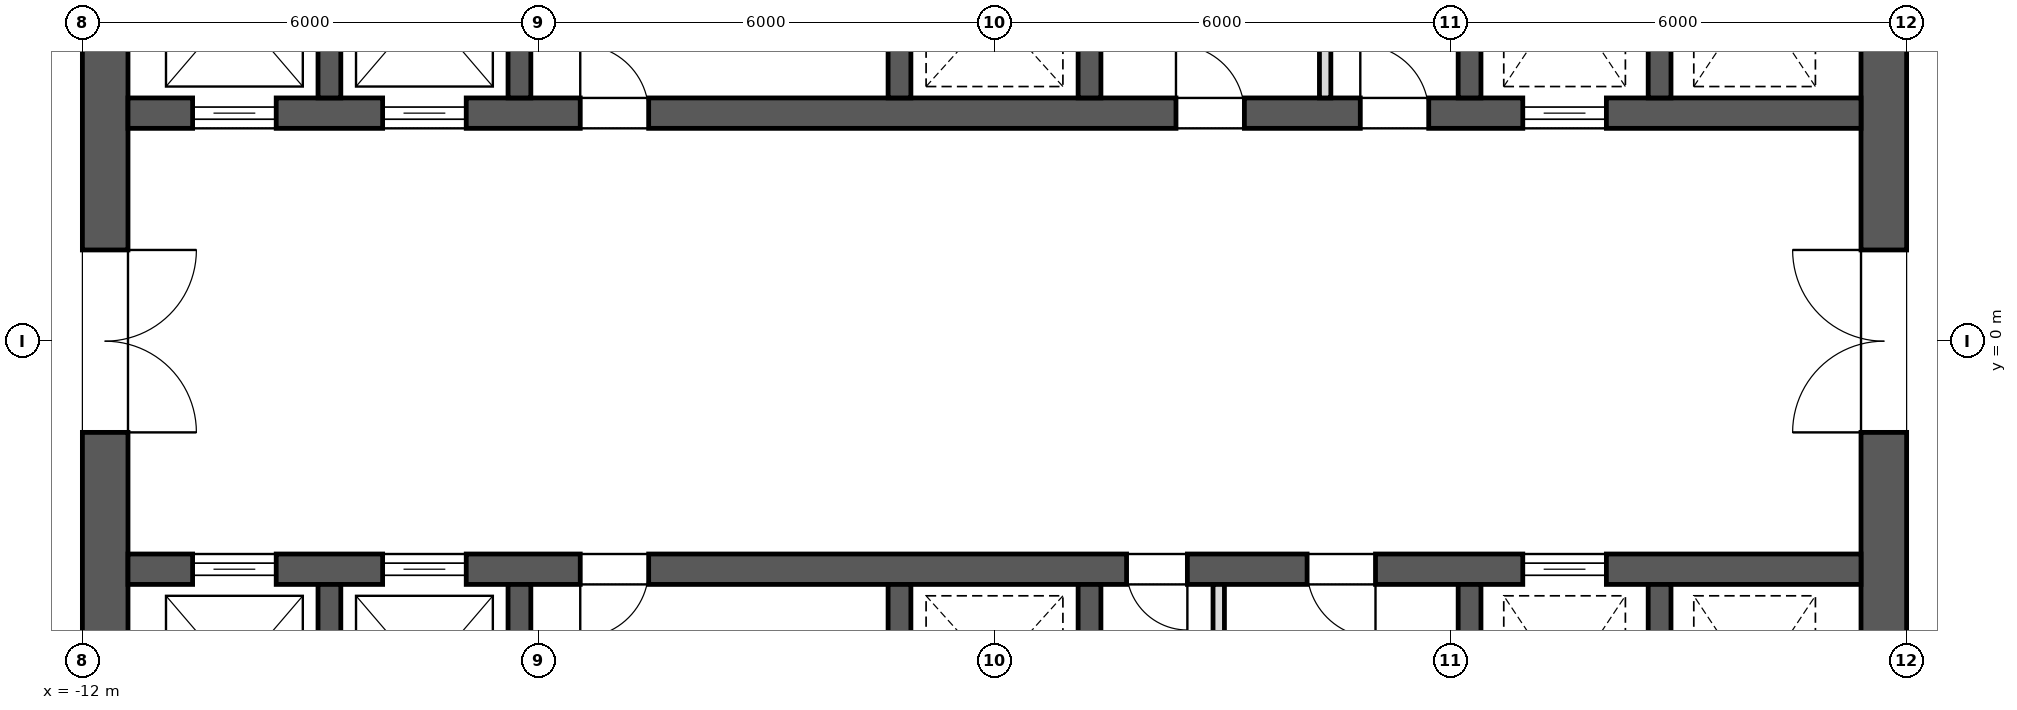
"""IFC4 building model, lengths in metres.
Left out: names, types, materials, properties, quantities, classifications, styles, units other than length and angle.
Written with IfcOpenShell. Run it as: python <this file> out.ifc"""

import sys

from ifc_helpers import new_model, si_unit, direction, frame, frame_2d, origin, place, context, subcontext, project, spatial, rectangle, extrude, element, fill, save


model = new_model("IFC4")
c1 = context("Model", 3, precision=1e-05, world=origin(), true_north=direction((0.0, 1.0)))
c2 = subcontext(c1, "Body", "Model", "MODEL_VIEW")
j1 = project(units=[si_unit("LENGTHUNIT", "METRE"), si_unit("PLANEANGLEUNIT", "RADIAN")], contexts=[c1])
p1 = place(None, origin())
s1 = spatial("IfcSite", under=j1, at=p1, CompositionType="ELEMENT")
p2 = place(p1, origin())
s2 = spatial("IfcBuilding", under=s1, at=p2, CompositionType="ELEMENT")
p3 = place(p2, frame((0.0, 0.0, 292.3)))
s3 = spatial("IfcBuildingStorey", under=s2, at=p3, CompositionType="ELEMENT", Elevation=292.3)
p4 = place(p3, frame((11.7, -11.4, 0.0), z_axis=(0.0, 0.0, 1.0), x_axis=(0.0, 1.0, 0.0)))
e1 = element("IfcWall", 1, at=p4, inside=s3, PredefinedType="SHEAR", context=c2, shape_type="SweptSolid", body=[
    extrude(rectangle(XDim=22.8, YDim=0.6, at=frame_2d((11.4, 0.0))), origin(), (0.0, 0.0, 1.0), 4.0),
])
p5 = place(p4, frame((10.2, 0.0, 0.0)))
e2 = element("IfcOpeningElement", 2, at=p5, cuts=e1, PredefinedType="OPENING", context=c2, shape_type="SweptSolid", body=[
    extrude(rectangle(XDim=2.4, YDim=2.1, at=frame_2d((1.2, 1.05))), frame((0.0, 0.312, 0.0), z_axis=(0.0, -1.0, 0.0), x_axis=(1.0, 0.0, 0.0)), (0.0, 0.0, 1.0), 0.624),
])
p6 = place(p4, frame((19.5, 0.0, 0.0)))
e3 = element("IfcOpeningElement", 3, at=p6, cuts=e1, PredefinedType="OPENING", context=c2, shape_type="SweptSolid", body=[
    extrude(rectangle(XDim=1.2, YDim=2.1, at=frame_2d((0.6, 1.05))), frame((0.0, 0.312, 0.0), z_axis=(0.0, -1.0, 0.0), x_axis=(1.0, 0.0, 0.0)), (0.0, 0.0, 1.0), 0.624),
])
p7 = place(p4, frame((2.1, 0.0, 0.0)))
e4 = element("IfcOpeningElement", 4, at=p7, cuts=e1, PredefinedType="OPENING", context=c2, shape_type="SweptSolid", body=[
    extrude(rectangle(XDim=1.2, YDim=2.1, at=frame_2d((0.6, 1.05))), frame((0.0, 0.312, 0.0), z_axis=(0.0, -1.0, 0.0), x_axis=(1.0, 0.0, 0.0)), (0.0, 0.0, 1.0), 0.624),
])
p8 = place(p3, frame((-11.7, -11.4, 0.0), z_axis=(0.0, 0.0, 1.0), x_axis=(0.0, 1.0, 0.0)))
e5 = element("IfcWall", 5, at=p8, inside=s3, PredefinedType="SHEAR", context=c2, shape_type="SweptSolid", body=[
    extrude(rectangle(XDim=22.8, YDim=0.6, at=frame_2d((11.4, 0.0))), origin(), (0.0, 0.0, 1.0), 4.0),
])
p9 = place(p8, frame((10.2, 0.0, 0.0)))
e6 = element("IfcOpeningElement", 6, at=p9, cuts=e5, PredefinedType="OPENING", context=c2, shape_type="SweptSolid", body=[
    extrude(rectangle(XDim=2.4, YDim=2.1, at=frame_2d((1.2, 1.05))), frame((0.0, 0.312, 0.0), z_axis=(0.0, -1.0, 0.0), x_axis=(1.0, 0.0, 0.0)), (0.0, 0.0, 1.0), 0.624),
])
p10 = place(p8, frame((18.925, 0.0, 0.0)))
e7 = element("IfcOpeningElement", 7, at=p10, cuts=e5, PredefinedType="OPENING", context=c2, shape_type="SweptSolid", body=[
    extrude(rectangle(XDim=1.2, YDim=2.1, at=frame_2d((0.6, 1.05))), frame((0.0, 0.312, 0.0), z_axis=(0.0, -1.0, 0.0), x_axis=(1.0, 0.0, 0.0)), (0.0, 0.0, 1.0), 0.624),
])
p11 = place(p8, frame((2.675, 0.0, 0.0)))
e8 = element("IfcOpeningElement", 8, at=p11, cuts=e5, PredefinedType="OPENING", context=c2, shape_type="SweptSolid", body=[
    extrude(rectangle(XDim=1.2, YDim=2.1, at=frame_2d((0.6, 1.05))), frame((0.0, 0.312, 0.0), z_axis=(0.0, -1.0, 0.0), x_axis=(1.0, 0.0, 0.0)), (0.0, 0.0, 1.0), 0.624),
])
p12 = place(p3, frame((-11.4, 3.0, 0.0), z_axis=(0.0, 0.0, 1.0), x_axis=(1.0, 0.0, 0.0)))
e9 = element("IfcWall", 9, at=p12, inside=s3, PredefinedType="SHEAR", context=c2, shape_type="SweptSolid", body=[
    extrude(rectangle(XDim=22.8, YDim=0.4, at=frame_2d((11.4, 0.0))), origin(), (0.0, 0.0, 1.0), 4.0),
])
p13 = place(p12, frame((0.85, 0.0, 0.0)))
e10 = element("IfcOpeningElement", 10, at=p13, cuts=e9, PredefinedType="OPENING", context=c2, shape_type="SweptSolid", body=[
    extrude(rectangle(XDim=1.1, YDim=2.1, at=frame_2d((0.55, 1.05))), frame((0.0, 0.212, 0.0), z_axis=(0.0, -1.0, 0.0), x_axis=(1.0, 0.0, 0.0)), (0.0, 0.0, 1.0), 0.424),
])
p14 = place(p12, frame((3.35, 0.0, 0.0)))
e11 = element("IfcOpeningElement", 11, at=p14, cuts=e9, PredefinedType="OPENING", context=c2, shape_type="SweptSolid", body=[
    extrude(rectangle(XDim=1.1, YDim=2.1, at=frame_2d((0.55, 1.05))), frame((0.0, 0.212, 0.0), z_axis=(0.0, -1.0, 0.0), x_axis=(1.0, 0.0, 0.0)), (0.0, 0.0, 1.0), 0.424),
])
p15 = place(p12, frame((18.35, 0.0, 0.0)))
e12 = element("IfcOpeningElement", 12, at=p15, cuts=e9, PredefinedType="OPENING", context=c2, shape_type="SweptSolid", body=[
    extrude(rectangle(XDim=1.1, YDim=2.1, at=frame_2d((0.55, 1.05))), frame((0.0, 0.212, 0.0), z_axis=(0.0, -1.0, 0.0), x_axis=(1.0, 0.0, 0.0)), (0.0, 0.0, 1.0), 0.424),
])
p16 = place(p12, frame((13.788, 0.0, 0.0)))
e13 = element("IfcOpeningElement", 13, at=p16, cuts=e9, PredefinedType="OPENING", context=c2, shape_type="SweptSolid", body=[
    extrude(rectangle(XDim=0.9, YDim=2.1, at=frame_2d((0.45, 1.05))), frame((0.0, 0.212, 0.0), z_axis=(0.0, -1.0, 0.0), x_axis=(1.0, 0.0, 0.0)), (0.0, 0.0, 1.0), 0.424),
])
p17 = place(p12, frame((16.212, 0.0, 0.0)))
e14 = element("IfcOpeningElement", 14, at=p17, cuts=e9, PredefinedType="OPENING", context=c2, shape_type="SweptSolid", body=[
    extrude(rectangle(XDim=0.9, YDim=2.1, at=frame_2d((0.45, 1.05))), frame((0.0, 0.212, 0.0), z_axis=(0.0, -1.0, 0.0), x_axis=(1.0, 0.0, 0.0)), (0.0, 0.0, 1.0), 0.424),
])
p18 = place(p12, frame((5.95, 0.0, 0.0)))
e15 = element("IfcOpeningElement", 15, at=p18, cuts=e9, PredefinedType="OPENING", context=c2, shape_type="SweptSolid", body=[
    extrude(rectangle(XDim=0.9, YDim=2.1, at=frame_2d((0.45, 1.05))), frame((0.0, 0.212, 0.0), z_axis=(0.0, -1.0, 0.0), x_axis=(1.0, 0.0, 0.0)), (0.0, 0.0, 1.0), 0.424),
])
for number, where, z_axis, x_axis in (
    (16, (-8.75, 3.2, 0.0), (0.0, 0.0, 1.0), (0.0, 1.0, 0.0)),
    (17, (-6.25, 3.2, 0.0), (0.0, 0.0, 1.0), (0.0, 1.0, 0.0)),
    (18, (-1.25, 3.2, 0.0), (0.0, 0.0, 1.0), (0.0, 1.0, 0.0)),
    (19, (1.25, 3.2, 0.0), (0.0, 0.0, 1.0), (0.0, 1.0, 0.0)),
    (20, (6.25, 3.2, 0.0), (0.0, 0.0, 1.0), (0.0, 1.0, 0.0)),
    (21, (8.75, 3.2, 0.0), (0.0, 0.0, 1.0), (0.0, 1.0, 0.0)),
):
    element("IfcWall", number, at=place(p3, frame(where, z_axis=z_axis, x_axis=x_axis)), inside=s3, PredefinedType="SHEAR", context=c2, shape_type="SweptSolid", body=[
        extrude(rectangle(XDim=2.9, YDim=0.3, at=frame_2d((1.45, 0.0))), origin(), (0.0, 0.0, 1.0), 4.0),
    ])
p19 = place(p3, frame((-11.4, -3.0, 0.0), z_axis=(0.0, 0.0, 1.0), x_axis=(1.0, 0.0, 0.0)))
e22 = element("IfcWall", 22, at=p19, inside=s3, PredefinedType="SHEAR", context=c2, shape_type="SweptSolid", body=[
    extrude(rectangle(XDim=22.8, YDim=0.4, at=frame_2d((11.4, 0.0))), origin(), (0.0, 0.0, 1.0), 4.0),
])
p20 = place(p19, frame((0.85, 0.0, 0.0)))
e23 = element("IfcOpeningElement", 23, at=p20, cuts=e22, PredefinedType="OPENING", context=c2, shape_type="SweptSolid", body=[
    extrude(rectangle(XDim=1.1, YDim=2.1, at=frame_2d((0.55, 1.05))), frame((0.0, 0.212, 0.0), z_axis=(0.0, -1.0, 0.0), x_axis=(1.0, 0.0, 0.0)), (0.0, 0.0, 1.0), 0.424),
])
p21 = place(p19, frame((3.35, 0.0, 0.0)))
e24 = element("IfcOpeningElement", 24, at=p21, cuts=e22, PredefinedType="OPENING", context=c2, shape_type="SweptSolid", body=[
    extrude(rectangle(XDim=1.1, YDim=2.1, at=frame_2d((0.55, 1.05))), frame((0.0, 0.212, 0.0), z_axis=(0.0, -1.0, 0.0), x_axis=(1.0, 0.0, 0.0)), (0.0, 0.0, 1.0), 0.424),
])
p22 = place(p19, frame((18.35, 0.0, 0.0)))
e25 = element("IfcOpeningElement", 25, at=p22, cuts=e22, PredefinedType="OPENING", context=c2, shape_type="SweptSolid", body=[
    extrude(rectangle(XDim=1.1, YDim=2.1, at=frame_2d((0.55, 1.05))), frame((0.0, 0.212, 0.0), z_axis=(0.0, -1.0, 0.0), x_axis=(1.0, 0.0, 0.0)), (0.0, 0.0, 1.0), 0.424),
])
p23 = place(p19, frame((13.137, 0.0, 0.0)))
e26 = element("IfcOpeningElement", 26, at=p23, cuts=e22, PredefinedType="OPENING", context=c2, shape_type="SweptSolid", body=[
    extrude(rectangle(XDim=0.8, YDim=2.1, at=frame_2d((0.4, 1.05))), frame((0.0, 0.212, 0.0), z_axis=(0.0, -1.0, 0.0), x_axis=(1.0, 0.0, 0.0)), (0.0, 0.0, 1.0), 0.424),
])
p24 = place(p19, frame((15.512, 0.0, 0.0)))
e27 = element("IfcOpeningElement", 27, at=p24, cuts=e22, PredefinedType="OPENING", context=c2, shape_type="SweptSolid", body=[
    extrude(rectangle(XDim=0.9, YDim=2.1, at=frame_2d((0.45, 1.05))), frame((0.0, 0.212, 0.0), z_axis=(0.0, -1.0, 0.0), x_axis=(1.0, 0.0, 0.0)), (0.0, 0.0, 1.0), 0.424),
])
p25 = place(p19, frame((5.95, 0.0, 0.0)))
e28 = element("IfcOpeningElement", 28, at=p25, cuts=e22, PredefinedType="OPENING", context=c2, shape_type="SweptSolid", body=[
    extrude(rectangle(XDim=0.9, YDim=2.1, at=frame_2d((0.45, 1.05))), frame((0.0, 0.212, 0.0), z_axis=(0.0, -1.0, 0.0), x_axis=(1.0, 0.0, 0.0)), (0.0, 0.0, 1.0), 0.424),
])
for number, where, z_axis, x_axis in (
    (29, (-8.75, -6.1, 0.0), (0.0, 0.0, 1.0), (0.0, 1.0, 0.0)),
    (30, (-6.25, -6.1, 0.0), (0.0, 0.0, 1.0), (0.0, 1.0, 0.0)),
    (31, (-1.25, -6.1, 0.0), (0.0, 0.0, 1.0), (0.0, 1.0, 0.0)),
    (32, (1.25, -6.1, 0.0), (0.0, 0.0, 1.0), (0.0, 1.0, 0.0)),
    (33, (6.25, -6.1, 0.0), (0.0, 0.0, 1.0), (0.0, 1.0, 0.0)),
    (34, (8.75, -6.1, 0.0), (0.0, 0.0, 1.0), (0.0, 1.0, 0.0)),
):
    element("IfcWall", number, at=place(p3, frame(where, z_axis=z_axis, x_axis=x_axis)), inside=s3, PredefinedType="SHEAR", context=c2, shape_type="SweptSolid", body=[
        extrude(rectangle(XDim=2.9, YDim=0.3, at=frame_2d((1.45, 0.0))), origin(), (0.0, 0.0, 1.0), 4.0),
    ])
for number, where, z_axis, x_axis in (
    (35, (4.35, 3.2, 0.0), (0.0, 0.0, 1.0), (0.0, 1.0, 0.0)),
    (36, (2.95, -6.1, 0.0), (0.0, 0.0, 1.0), (0.0, 1.0, 0.0)),
):
    element("IfcWall", number, at=place(p3, frame(where, z_axis=z_axis, x_axis=x_axis)), inside=s3, PredefinedType="PARTITIONING", context=c2, shape_type="SweptSolid", body=[
        extrude(rectangle(XDim=2.9, YDim=0.15, at=frame_2d((1.45, 0.0))), origin(), (0.0, 0.0, 1.0), 3.7),
    ])
p26 = place(p13, origin())
e37 = element("IfcDoor", 37, at=p26, inside=s3, OperationType="SLIDING_TO_LEFT", PredefinedType="DOOR", context=c2, shape_type="SweptSolid", body=[
    extrude(rectangle(XDim=1.1, YDim=2.1, at=frame_2d((0.55, 1.05))), frame((0.0, 0.025, 0.0), z_axis=(0.0, -1.0, 0.0), x_axis=(1.0, 0.0, 0.0)), (0.0, 0.0, 1.0), 0.05),
])
fill(e10, e37)
p27 = place(p14, origin())
e38 = element("IfcDoor", 38, at=p27, inside=s3, OperationType="SLIDING_TO_LEFT", PredefinedType="DOOR", context=c2, shape_type="SweptSolid", body=[
    extrude(rectangle(XDim=1.1, YDim=2.1, at=frame_2d((0.55, 1.05))), frame((0.0, 0.025, 0.0), z_axis=(0.0, -1.0, 0.0), x_axis=(1.0, 0.0, 0.0)), (0.0, 0.0, 1.0), 0.05),
])
fill(e11, e38)
p28 = place(p20, origin())
e39 = element("IfcDoor", 39, at=p28, inside=s3, OperationType="SLIDING_TO_LEFT", PredefinedType="DOOR", context=c2, shape_type="SweptSolid", body=[
    extrude(rectangle(XDim=1.1, YDim=2.1, at=frame_2d((0.55, 1.05))), frame((0.0, 0.025, 0.0), z_axis=(0.0, -1.0, 0.0), x_axis=(1.0, 0.0, 0.0)), (0.0, 0.0, 1.0), 0.05),
])
fill(e23, e39)
p29 = place(p21, origin())
e40 = element("IfcDoor", 40, at=p29, inside=s3, OperationType="SLIDING_TO_LEFT", PredefinedType="DOOR", context=c2, shape_type="SweptSolid", body=[
    extrude(rectangle(XDim=1.1, YDim=2.1, at=frame_2d((0.55, 1.05))), frame((0.0, 0.025, 0.0), z_axis=(0.0, -1.0, 0.0), x_axis=(1.0, 0.0, 0.0)), (0.0, 0.0, 1.0), 0.05),
])
fill(e24, e40)
p30 = place(p15, origin())
e41 = element("IfcDoor", 41, at=p30, inside=s3, OperationType="SLIDING_TO_LEFT", PredefinedType="DOOR", context=c2, shape_type="SweptSolid", body=[
    extrude(rectangle(XDim=1.1, YDim=2.1, at=frame_2d((0.55, 1.05))), frame((0.0, 0.025, 0.0), z_axis=(0.0, -1.0, 0.0), x_axis=(1.0, 0.0, 0.0)), (0.0, 0.0, 1.0), 0.05),
])
fill(e12, e41)
p31 = place(p22, origin())
e42 = element("IfcDoor", 42, at=p31, inside=s3, OperationType="SLIDING_TO_LEFT", PredefinedType="DOOR", context=c2, shape_type="SweptSolid", body=[
    extrude(rectangle(XDim=1.1, YDim=2.1, at=frame_2d((0.55, 1.05))), frame((0.0, 0.025, 0.0), z_axis=(0.0, -1.0, 0.0), x_axis=(1.0, 0.0, 0.0)), (0.0, 0.0, 1.0), 0.05),
])
fill(e25, e42)
p32 = place(p9, frame((2.4, 0.0, 0.0), z_axis=(0.0, 0.0, 1.0), x_axis=(-1.0, 0.0, 0.0)))
e43 = element("IfcDoor", 43, at=p32, inside=s3, OperationType="DOUBLE_DOOR_SINGLE_SWING", PredefinedType="DOOR", context=c2, shape_type="SweptSolid", body=[
    extrude(rectangle(XDim=2.4, YDim=2.1, at=frame_2d((1.2, 1.05))), frame((0.0, 0.025, 0.0), z_axis=(0.0, -1.0, 0.0), x_axis=(1.0, 0.0, 0.0)), (0.0, 0.0, 1.0), 0.05),
])
fill(e6, e43)
p33 = place(p5, origin())
e44 = element("IfcDoor", 44, at=p33, inside=s3, OperationType="DOUBLE_DOOR_SINGLE_SWING", PredefinedType="DOOR", context=c2, shape_type="SweptSolid", body=[
    extrude(rectangle(XDim=2.4, YDim=2.1, at=frame_2d((1.2, 1.05))), frame((0.0, 0.025, 0.0), z_axis=(0.0, -1.0, 0.0), x_axis=(1.0, 0.0, 0.0)), (0.0, 0.0, 1.0), 0.05),
])
fill(e2, e44)
p34 = place(p16, origin())
e45 = element("IfcDoor", 45, at=p34, inside=s3, OperationType="SINGLE_SWING_RIGHT", PredefinedType="DOOR", context=c2, shape_type="SweptSolid", body=[
    extrude(rectangle(XDim=0.9, YDim=2.1, at=frame_2d((0.45, 1.05))), frame((0.0, 0.025, 0.0), z_axis=(0.0, -1.0, 0.0), x_axis=(1.0, 0.0, 0.0)), (0.0, 0.0, 1.0), 0.05),
])
fill(e13, e45)
p35 = place(p17, origin())
e46 = element("IfcDoor", 46, at=p35, inside=s3, OperationType="SINGLE_SWING_RIGHT", PredefinedType="DOOR", context=c2, shape_type="SweptSolid", body=[
    extrude(rectangle(XDim=0.9, YDim=2.1, at=frame_2d((0.45, 1.05))), frame((0.0, 0.025, 0.0), z_axis=(0.0, -1.0, 0.0), x_axis=(1.0, 0.0, 0.0)), (0.0, 0.0, 1.0), 0.05),
])
fill(e14, e46)
p36 = place(p18, origin())
e47 = element("IfcDoor", 47, at=p36, inside=s3, OperationType="SINGLE_SWING_RIGHT", PredefinedType="DOOR", context=c2, shape_type="SweptSolid", body=[
    extrude(rectangle(XDim=0.9, YDim=2.1, at=frame_2d((0.45, 1.05))), frame((0.0, 0.025, 0.0), z_axis=(0.0, -1.0, 0.0), x_axis=(1.0, 0.0, 0.0)), (0.0, 0.0, 1.0), 0.05),
])
fill(e15, e47)
p37 = place(p23, frame((0.8, 0.0, 0.0), z_axis=(0.0, 0.0, 1.0), x_axis=(-1.0, 0.0, 0.0)))
e48 = element("IfcDoor", 48, at=p37, inside=s3, OperationType="SINGLE_SWING_RIGHT", PredefinedType="DOOR", context=c2, shape_type="SweptSolid", body=[
    extrude(rectangle(XDim=0.8, YDim=2.1, at=frame_2d((0.4, 1.05))), frame((0.0, 0.025, 0.0), z_axis=(0.0, -1.0, 0.0), x_axis=(1.0, 0.0, 0.0)), (0.0, 0.0, 1.0), 0.05),
])
fill(e26, e48)
p38 = place(p24, frame((0.9, 0.0, 0.0), z_axis=(0.0, 0.0, 1.0), x_axis=(-1.0, 0.0, 0.0)))
e49 = element("IfcDoor", 49, at=p38, inside=s3, OperationType="SINGLE_SWING_RIGHT", PredefinedType="DOOR", context=c2, shape_type="SweptSolid", body=[
    extrude(rectangle(XDim=0.9, YDim=2.1, at=frame_2d((0.45, 1.05))), frame((0.0, 0.025, 0.0), z_axis=(0.0, -1.0, 0.0), x_axis=(1.0, 0.0, 0.0)), (0.0, 0.0, 1.0), 0.05),
])
fill(e27, e49)
p39 = place(p25, frame((0.9, 0.0, 0.0), z_axis=(0.0, 0.0, 1.0), x_axis=(-1.0, 0.0, 0.0)))
e50 = element("IfcDoor", 50, at=p39, inside=s3, OperationType="SINGLE_SWING_LEFT", PredefinedType="DOOR", context=c2, shape_type="SweptSolid", body=[
    extrude(rectangle(XDim=0.9, YDim=2.1, at=frame_2d((0.45, 1.05))), frame((0.0, 0.025, 0.0), z_axis=(0.0, -1.0, 0.0), x_axis=(1.0, 0.0, 0.0)), (0.0, 0.0, 1.0), 0.05),
])
fill(e28, e50)
save(model, sys.argv[1])
